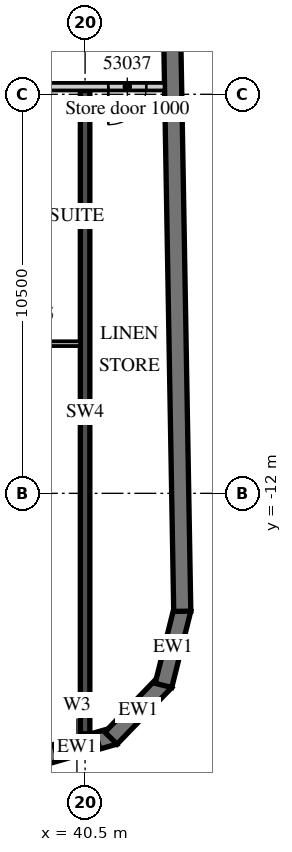
"""IFC4 building model, lengths in metres.
Left out: names, types, materials, properties, quantities, classifications, styles, units other than length and angle.
Written with IfcOpenShell. Run it as: python <this file> out.ifc"""

import sys

from ifc_helpers import new_model, si_unit, direction, frame, frame_2d, origin, place, context, subcontext, project, spatial, polyline, rectangle, outline, extrude, element, fill, save


model = new_model("IFC4")
c1 = context("Model", 3, precision=1e-05, world=origin(), true_north=direction((0.0, 1.0)))
c2 = subcontext(c1, "Body", "Model", "MODEL_VIEW")
j1 = project(units=[si_unit("LENGTHUNIT", "METRE"), si_unit("PLANEANGLEUNIT", "RADIAN")], contexts=[c1])
p1 = place(None, origin())
s1 = spatial("IfcSite", under=j1, at=p1, CompositionType="ELEMENT")
p2 = place(p1, origin())
s2 = spatial("IfcBuilding", under=s1, at=p2, CompositionType="ELEMENT")
p3 = place(p2, frame((0.0, 0.0, 221.0)))
s3 = spatial("IfcBuildingStorey", under=s2, at=p3, CompositionType="ELEMENT", Elevation=221.0)
p4 = place(p3, frame((40.5, -18.325, 0.0), z_axis=(0.0, 0.0, 1.0), x_axis=(0.0, 1.0, 0.0)))
e1 = element("IfcWall", 1, at=p4, inside=s3, PredefinedType="SHEAR", context=c2, shape_type="SweptSolid", body=[
    extrude(rectangle(XDim=16.925, YDim=0.25, at=frame_2d((8.463, 0.0))), origin(), (0.0, 0.0, 1.0), 3.3),
])
p5 = place(p3, frame((39.29, -18.952, 0.0), z_axis=(0.0, 0.0, 1.0), x_axis=(0.961247584925, 0.275686562016, 0.0)))
e2 = element("IfcWall", 2, at=p5, inside=s3, PredefinedType="SOLIDWALL", context=c2, shape_type="SweptSolid", body=[
    extrude(outline(polyline([(0.0, -0.225), (2.071, -0.225), (1.95, 0.225), (0.121, 0.225), (0.0, -0.225)])), origin(), (0.0, 0.0, 1.0), 3.02),
])
p6 = place(p5, frame((0.435, 0.0, 0.45)))
e3 = element("IfcOpeningElement", 3, at=p6, cuts=e2, PredefinedType="OPENING", context=c2, shape_type="SweptSolid", body=[
    extrude(rectangle(XDim=1.2, YDim=2.25, at=frame_2d((0.6, 1.125))), frame((0.0, 0.235, 0.0), z_axis=(0.0, -1.0, 0.0), x_axis=(1.0, 0.0, 0.0)), (0.0, 0.0, 1.0), 0.47),
])
p7 = place(p3, frame((41.181, -18.442, 0.0), z_axis=(0.0, 0.0, 1.0), x_axis=(0.694678672846, 0.719320193998, 0.0)))
e4 = element("IfcWall", 4, at=p7, inside=s3, PredefinedType="SOLIDWALL", context=c2, shape_type="SweptSolid", body=[
    extrude(outline(polyline([(0.0, -0.225), (2.071, -0.225), (1.95, 0.225), (0.121, 0.225), (0.0, -0.225)])), origin(), (0.0, 0.0, 1.0), 3.02),
])
p8 = place(p3, frame((42.563, -17.054, 0.0), z_axis=(0.0, 0.0, 1.0), x_axis=(0.241841950319, 0.970315655375, 0.0)))
e5 = element("IfcWall", 5, at=p8, inside=s3, PredefinedType="SOLIDWALL", context=c2, shape_type="SweptSolid", body=[
    extrude(outline(polyline([(0.0, -0.225), (2.071, -0.225), (1.95, 0.225), (0.121, 0.225), (0.0, -0.225)])), origin(), (0.0, 0.0, 1.0), 3.02),
])
p9 = place(p3, frame((43.057, -15.103, 0.0), z_axis=(0.0, 0.0, 1.0), x_axis=(-0.017452408953, 0.999847695112, 0.0)))
e6 = element("IfcWall", 6, at=p9, inside=s3, PredefinedType="SOLIDWALL", context=c2, shape_type="SweptSolid", body=[
    extrude(rectangle(XDim=33.0, YDim=0.45, at=frame_2d((16.5, 0.0))), origin(), (0.0, 0.0, 1.0), 3.02),
])
p10 = place(p3, frame((13.5, -1.3, 0.0), z_axis=(0.0, 0.0, 1.0), x_axis=(1.0, 0.0, 0.0)))
e7 = element("IfcWall", 7, at=p10, inside=s3, PredefinedType="PARTITIONING", context=c2, shape_type="SweptSolid", body=[
    extrude(rectangle(XDim=29.091, YDim=0.2, at=frame_2d((14.545, 0.0))), origin(), (0.0, 0.0, 1.0), 3.02),
])
p11 = place(p10, frame((0.575, 0.0, 0.0)))
e8 = element("IfcOpeningElement", 8, at=p11, cuts=e7, PredefinedType="OPENING", context=c2, shape_type="SweptSolid", body=[
    extrude(rectangle(XDim=1.0, YDim=2.1, at=frame_2d((0.5, 1.05))), frame((0.0, 0.11, 0.0), z_axis=(0.0, -1.0, 0.0), x_axis=(1.0, 0.0, 0.0)), (0.0, 0.0, 1.0), 0.22),
])
p12 = place(p10, frame((9.862, 0.0, 0.0)))
e9 = element("IfcOpeningElement", 9, at=p12, cuts=e7, PredefinedType="OPENING", context=c2, shape_type="SweptSolid", body=[
    extrude(rectangle(XDim=1.2, YDim=2.1, at=frame_2d((0.6, 1.05))), frame((0.0, 0.11, 0.0), z_axis=(0.0, -1.0, 0.0), x_axis=(1.0, 0.0, 0.0)), (0.0, 0.0, 1.0), 0.22),
])
p13 = place(p10, frame((18.862, 0.0, 0.0)))
e10 = element("IfcOpeningElement", 10, at=p13, cuts=e7, PredefinedType="OPENING", context=c2, shape_type="SweptSolid", body=[
    extrude(rectangle(XDim=1.2, YDim=2.1, at=frame_2d((0.6, 1.05))), frame((0.0, 0.11, 0.0), z_axis=(0.0, -1.0, 0.0), x_axis=(1.0, 0.0, 0.0)), (0.0, 0.0, 1.0), 0.22),
])
p14 = place(p10, frame((23.075, 0.0, 0.0)))
e11 = element("IfcOpeningElement", 11, at=p14, cuts=e7, PredefinedType="OPENING", context=c2, shape_type="SweptSolid", body=[
    extrude(rectangle(XDim=1.0, YDim=2.1, at=frame_2d((0.5, 1.05))), frame((0.0, 0.11, 0.0), z_axis=(0.0, -1.0, 0.0), x_axis=(1.0, 0.0, 0.0)), (0.0, 0.0, 1.0), 0.22),
])
p15 = place(p10, frame((27.611, 0.0, 0.0)))
e12 = element("IfcOpeningElement", 12, at=p15, cuts=e7, PredefinedType="OPENING", context=c2, shape_type="SweptSolid", body=[
    extrude(rectangle(XDim=1.0, YDim=2.4, at=frame_2d((0.5, 1.2))), frame((0.0, 0.11, 0.0), z_axis=(0.0, -1.0, 0.0), x_axis=(1.0, 0.0, 0.0)), (0.0, 0.0, 1.0), 0.22),
])
p16 = place(p3, frame((38.15, -8.062, 0.0), z_axis=(0.0, 0.0, 1.0), x_axis=(1.0, 0.0, 0.0)))
e13 = element("IfcWall", 13, at=p16, inside=s3, PredefinedType="PARTITIONING", context=c2, shape_type="SweptSolid", body=[
    extrude(rectangle(XDim=2.225, YDim=0.125, at=frame_2d((1.113, 0.0))), origin(), (0.0, 0.0, 1.0), 3.02),
])
p17 = place(p6, origin())
e14 = element("IfcWindow", 14, at=p17, inside=s3, PartitioningType="SINGLE_PANEL", PredefinedType="WINDOW", context=c2, shape_type="SweptSolid", body=[
    extrude(rectangle(XDim=1.2, YDim=2.25, at=frame_2d((0.6, 1.125))), frame((0.0, 0.09, 0.0), z_axis=(0.0, -1.0, 0.0), x_axis=(1.0, 0.0, 0.0)), (0.0, 0.0, 1.0), 0.06),
])
fill(e3, e14)
p18 = place(p15, origin())
e15 = element("IfcDoor", 15, at=p18, inside=s3, OperationType="SINGLE_SWING_LEFT", PredefinedType="DOOR", context=c2, shape_type="SweptSolid", body=[
    extrude(rectangle(XDim=1.0, YDim=2.4, at=frame_2d((0.5, 1.2))), frame((0.0, 0.025, 0.0), z_axis=(0.0, -1.0, 0.0), x_axis=(1.0, 0.0, 0.0)), (0.0, 0.0, 1.0), 0.05),
])
fill(e12, e15)
save(model, sys.argv[1])
